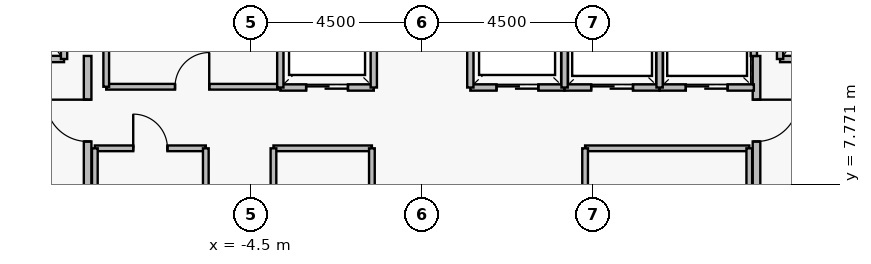
"""IFC4 building model, lengths in metres.
Left out: names, types, materials, properties, quantities, classifications, styles, units other than length and angle.
Written with IfcOpenShell. Run it as: python <this file> out.ifc"""

import sys

from ifc_helpers import new_model, si_unit, direction, frame, frame_2d, origin, place, context, subcontext, project, spatial, rectangle, extrude, element, fill, save


model = new_model("IFC4")
c1 = context("Model", 3, precision=1e-05, world=origin(), true_north=direction((0.0, 1.0)))
c2 = subcontext(c1, "Body", "Model", "MODEL_VIEW")
j1 = project(units=[si_unit("LENGTHUNIT", "METRE"), si_unit("PLANEANGLEUNIT", "RADIAN")], contexts=[c1])
p1 = place(None, origin())
s1 = spatial("IfcSite", under=j1, at=p1, CompositionType="ELEMENT")
p2 = place(p1, origin())
s2 = spatial("IfcBuilding", under=s1, at=p2, CompositionType="ELEMENT")
p3 = place(p2, frame((0.0, 0.0, 226.15)))
s3 = spatial("IfcBuildingStorey", under=s2, at=p3, CompositionType="ELEMENT", Elevation=226.15)
p4 = place(p3, frame((-8.8, 5.05, 0.0), z_axis=(0.0, 0.0, 1.0), x_axis=(0.0, 1.0, 0.0)))
e1 = element("IfcWall", 1, at=p4, inside=s3, PredefinedType="PARTITIONING", context=c2, shape_type="SweptSolid", body=[
    extrude(rectangle(XDim=6.1, YDim=0.2, at=frame_2d((3.05, 0.0))), origin(), (0.0, 0.0, 1.0), 3.53),
])
p5 = place(p4, frame((0.25, 0.0, 0.0)))
e2 = element("IfcOpeningElement", 2, at=p5, cuts=e1, PredefinedType="OPENING", context=c2, shape_type="SweptSolid", body=[
    extrude(rectangle(XDim=1.1, YDim=2.2, at=frame_2d((0.55, 1.1))), frame((0.0, 0.11, 0.0), z_axis=(0.0, -1.0, 0.0), x_axis=(1.0, 0.0, 0.0)), (0.0, 0.0, 1.0), 0.22),
])
p6 = place(p4, frame((3.85, 0.0, 0.0)))
e3 = element("IfcOpeningElement", 3, at=p6, cuts=e1, PredefinedType="OPENING", context=c2, shape_type="SweptSolid", body=[
    extrude(rectangle(XDim=1.1, YDim=2.2, at=frame_2d((0.55, 1.1))), frame((0.0, 0.11, 0.0), z_axis=(0.0, -1.0, 0.0), x_axis=(1.0, 0.0, 0.0)), (0.0, 0.0, 1.0), 0.22),
])
p7 = place(p3, frame((8.8, 11.15, 0.0), z_axis=(0.0, 0.0, 1.0), x_axis=(0.0, -1.0, 0.0)))
e4 = element("IfcWall", 4, at=p7, inside=s3, PredefinedType="PARTITIONING", context=c2, shape_type="SweptSolid", body=[
    extrude(rectangle(XDim=6.1, YDim=0.2, at=frame_2d((3.05, 0.0))), origin(), (0.0, 0.0, 1.0), 3.53),
])
p8 = place(p7, frame((1.15, 0.0, 0.0)))
e5 = element("IfcOpeningElement", 5, at=p8, cuts=e4, PredefinedType="OPENING", context=c2, shape_type="SweptSolid", body=[
    extrude(rectangle(XDim=1.1, YDim=2.2, at=frame_2d((0.55, 1.1))), frame((0.0, 0.11, 0.0), z_axis=(0.0, -1.0, 0.0), x_axis=(1.0, 0.0, 0.0)), (0.0, 0.0, 1.0), 0.22),
])
p9 = place(p7, frame((4.75, 0.0, 0.0)))
e6 = element("IfcOpeningElement", 6, at=p9, cuts=e4, PredefinedType="OPENING", context=c2, shape_type="SweptSolid", body=[
    extrude(rectangle(XDim=1.1, YDim=2.2, at=frame_2d((0.55, 1.1))), frame((0.0, 0.11, 0.0), z_axis=(0.0, -1.0, 0.0), x_axis=(1.0, 0.0, 0.0)), (0.0, 0.0, 1.0), 0.22),
])
p10 = place(p3, frame((-11.58, 11.07, 0.0), z_axis=(0.0, 0.0, 1.0), x_axis=(1.0, 0.0, 0.0)))
e7 = element("IfcWall", 7, at=p10, inside=s3, PredefinedType="PARTITIONING", context=c2, shape_type="SweptSolid", body=[
    extrude(rectangle(XDim=2.16, YDim=0.165, at=frame_2d((1.08, 0.0))), origin(), (0.0, 0.0, 1.0), 3.53),
])
p11 = place(p10, frame((0.53, 0.0, 0.0)))
e8 = element("IfcOpeningElement", 8, at=p11, cuts=e7, PredefinedType="OPENING", context=c2, shape_type="SweptSolid", body=[
    extrude(rectangle(XDim=1.15, YDim=2.25, at=frame_2d((0.575, 1.125))), frame((0.0, 0.093, 0.0), z_axis=(0.0, -1.0, 0.0), x_axis=(1.0, 0.0, 0.0)), (0.0, 0.0, 1.0), 0.185),
])
p12 = place(p3, frame((9.42, 11.07, 0.0), z_axis=(0.0, 0.0, 1.0), x_axis=(1.0, 0.0, 0.0)))
e9 = element("IfcWall", 9, at=p12, inside=s3, PredefinedType="PARTITIONING", context=c2, shape_type="SweptSolid", body=[
    extrude(rectangle(XDim=2.16, YDim=0.165, at=frame_2d((1.08, 0.0))), origin(), (0.0, 0.0, 1.0), 3.53),
])
p13 = place(p12, frame((0.53, 0.0, 0.0)))
e10 = element("IfcOpeningElement", 10, at=p13, cuts=e9, PredefinedType="OPENING", context=c2, shape_type="SweptSolid", body=[
    extrude(rectangle(XDim=1.15, YDim=2.25, at=frame_2d((0.575, 1.125))), frame((0.0, 0.093, 0.0), z_axis=(0.0, -1.0, 0.0), x_axis=(1.0, 0.0, 0.0)), (0.0, 0.0, 1.0), 0.185),
])
p14 = place(p3, frame((-3.73, 10.32, 0.0), z_axis=(0.0, 0.0, 1.0), x_axis=(1.0, 0.0, 0.0)))
e11 = element("IfcWall", 11, at=p14, inside=s3, PredefinedType="PARTITIONING", context=c2, shape_type="SweptSolid", body=[
    extrude(rectangle(XDim=2.46, YDim=0.165, at=frame_2d((1.23, 0.0))), origin(), (0.0, 0.0, 1.0), 3.53),
])
p15 = place(p14, frame((0.68, 0.0, 0.0)))
e12 = element("IfcOpeningElement", 12, at=p15, cuts=e11, PredefinedType="OPENING", context=c2, shape_type="SweptSolid", body=[
    extrude(rectangle(XDim=1.1, YDim=2.25, at=frame_2d((0.55, 1.125))), frame((0.0, 0.093, 0.0), z_axis=(0.0, -1.0, 0.0), x_axis=(1.0, 0.0, 0.0)), (0.0, 0.0, 1.0), 0.185),
])
p16 = place(p3, frame((1.27, 10.32, 0.0), z_axis=(0.0, 0.0, 1.0), x_axis=(1.0, 0.0, 0.0)))
e13 = element("IfcWall", 13, at=p16, inside=s3, PredefinedType="PARTITIONING", context=c2, shape_type="SweptSolid", body=[
    extrude(rectangle(XDim=2.48, YDim=0.165, at=frame_2d((1.24, 0.0))), origin(), (0.0, 0.0, 1.0), 3.53),
])
p17 = place(p16, frame((0.69, 0.0, 0.0)))
e14 = element("IfcOpeningElement", 14, at=p17, cuts=e13, PredefinedType="OPENING", context=c2, shape_type="SweptSolid", body=[
    extrude(rectangle(XDim=1.1, YDim=2.25, at=frame_2d((0.55, 1.125))), frame((0.0, 0.093, 0.0), z_axis=(0.0, -1.0, 0.0), x_axis=(1.0, 0.0, 0.0)), (0.0, 0.0, 1.0), 0.185),
])
p18 = place(p3, frame((3.75, 10.32, 0.0), z_axis=(0.0, 0.0, 1.0), x_axis=(1.0, 0.0, 0.0)))
e15 = element("IfcWall", 15, at=p18, inside=s3, PredefinedType="PARTITIONING", context=c2, shape_type="SweptSolid", body=[
    extrude(rectangle(XDim=2.5, YDim=0.165, at=frame_2d((1.25, 0.0))), origin(), (0.0, 0.0, 1.0), 3.53),
])
p19 = place(p18, frame((0.7, 0.0, 0.0)))
e16 = element("IfcOpeningElement", 16, at=p19, cuts=e15, PredefinedType="OPENING", context=c2, shape_type="SweptSolid", body=[
    extrude(rectangle(XDim=1.1, YDim=2.25, at=frame_2d((0.55, 1.125))), frame((0.0, 0.093, 0.0), z_axis=(0.0, -1.0, 0.0), x_axis=(1.0, 0.0, 0.0)), (0.0, 0.0, 1.0), 0.185),
])
p20 = place(p3, frame((6.25, 10.32, 0.0), z_axis=(0.0, 0.0, 1.0), x_axis=(1.0, 0.0, 0.0)))
e17 = element("IfcWall", 17, at=p20, inside=s3, PredefinedType="PARTITIONING", context=c2, shape_type="SweptSolid", body=[
    extrude(rectangle(XDim=2.48, YDim=0.165, at=frame_2d((1.24, 0.0))), origin(), (0.0, 0.0, 1.0), 3.53),
])
p21 = place(p20, frame((0.69, 0.0, 0.0)))
e18 = element("IfcOpeningElement", 18, at=p21, cuts=e17, PredefinedType="OPENING", context=c2, shape_type="SweptSolid", body=[
    extrude(rectangle(XDim=1.1, YDim=2.25, at=frame_2d((0.55, 1.125))), frame((0.0, 0.093, 0.0), z_axis=(0.0, -1.0, 0.0), x_axis=(1.0, 0.0, 0.0)), (0.0, 0.0, 1.0), 0.185),
])
p22 = place(p3, frame((-8.31, 10.34, 0.0), z_axis=(0.0, 0.0, 1.0), x_axis=(1.0, 0.0, 0.0)))
e19 = element("IfcWall", 19, at=p22, inside=s3, PredefinedType="PARTITIONING", context=c2, shape_type="SweptSolid", body=[
    extrude(rectangle(XDim=4.52, YDim=0.15, at=frame_2d((2.26, 0.0))), origin(), (0.0, 0.0, 1.0), 3.53),
])
p23 = place(p22, frame((1.81, 0.0, 0.0)))
e20 = element("IfcOpeningElement", 20, at=p23, cuts=e19, PredefinedType="OPENING", context=c2, shape_type="SweptSolid", body=[
    extrude(rectangle(XDim=0.9, YDim=2.15, at=frame_2d((0.45, 1.075))), frame((0.0, 0.085, 0.0), z_axis=(0.0, -1.0, 0.0), x_axis=(1.0, 0.0, 0.0)), (0.0, 0.0, 1.0), 0.17),
])
p24 = place(p3, frame((-8.61, 8.72, 0.0), z_axis=(0.0, 0.0, 1.0), x_axis=(1.0, 0.0, 0.0)))
e21 = element("IfcWall", 21, at=p24, inside=s3, PredefinedType="PARTITIONING", context=c2, shape_type="SweptSolid", body=[
    extrude(rectangle(XDim=2.92, YDim=0.15, at=frame_2d((1.46, 0.0))), origin(), (0.0, 0.0, 1.0), 3.53),
])
p25 = place(p24, frame((1.01, 0.0, 0.0)))
e22 = element("IfcOpeningElement", 22, at=p25, cuts=e21, PredefinedType="OPENING", context=c2, shape_type="SweptSolid", body=[
    extrude(rectangle(XDim=0.9, YDim=2.15, at=frame_2d((0.45, 1.075))), frame((0.0, 0.085, 0.0), z_axis=(0.0, -1.0, 0.0), x_axis=(1.0, 0.0, 0.0)), (0.0, 0.0, 1.0), 0.17),
])
for number, where, z_axis, x_axis in (
    (23, (-9.42, 11.07, 0.0), (0.0, 0.0, 1.0), (0.0, 1.0, 0.0)),
    (24, (9.42, 11.07, 0.0), (0.0, 0.0, 1.0), (0.0, 1.0, 0.0)),
):
    element("IfcWall", number, at=place(p3, frame(where, z_axis=z_axis, x_axis=x_axis)), inside=s3, PredefinedType="PARTITIONING", context=c2, shape_type="SweptSolid", body=[
        extrude(rectangle(XDim=2.96, YDim=0.165, at=frame_2d((1.48, 0.0))), origin(), (0.0, 0.0, 1.0), 3.53),
    ])
for number, where, z_axis, x_axis in (
    (25, (-3.73, 10.32, 0.0), (0.0, 0.0, 1.0), (0.0, 1.0, 0.0)),
    (26, (-1.27, 10.32, 0.0), (0.0, 0.0, 1.0), (0.0, 1.0, 0.0)),
    (27, (1.27, 10.32, 0.0), (0.0, 0.0, 1.0), (0.0, 1.0, 0.0)),
    (28, (3.75, 10.32, 0.0), (0.0, 0.0, 1.0), (0.0, 1.0, 0.0)),
    (29, (6.25, 10.32, 0.0), (0.0, 0.0, 1.0), (0.0, 1.0, 0.0)),
):
    element("IfcWall", number, at=place(p3, frame(where, z_axis=z_axis, x_axis=x_axis)), inside=s3, PredefinedType="PARTITIONING", context=c2, shape_type="SweptSolid", body=[
        extrude(rectangle(XDim=2.36, YDim=0.165, at=frame_2d((1.18, 0.0))), origin(), (0.0, 0.0, 1.0), 3.53),
    ])
p26 = place(p3, frame((8.73, 11.15, 0.0), z_axis=(0.0, 0.0, 1.0), x_axis=(0.0, 1.0, 0.0)))
e30 = element("IfcWall", 30, at=p26, inside=s3, PredefinedType="PARTITIONING", context=c2, shape_type="SweptSolid", body=[
    extrude(rectangle(XDim=1.53, YDim=0.165, at=frame_2d((0.765, 0.0))), origin(), (0.0, 0.0, 1.0), 3.53),
])
p27 = place(p3, frame((-8.31, 10.34, 0.0), z_axis=(0.0, 0.0, 1.0), x_axis=(0.0, 1.0, 0.0)))
e31 = element("IfcWall", 31, at=p27, inside=s3, PredefinedType="PARTITIONING", context=c2, shape_type="SweptSolid", body=[
    extrude(rectangle(XDim=2.52, YDim=0.15, at=frame_2d((1.26, 0.0))), origin(), (0.0, 0.0, 1.0), 3.53),
])
for number, where, z_axis, x_axis in (
    (32, (-8.61, 6.48, 0.0), (0.0, 0.0, 1.0), (0.0, 1.0, 0.0)),
    (33, (-5.69, 6.48, 0.0), (0.0, 0.0, 1.0), (0.0, 1.0, 0.0)),
):
    element("IfcWall", number, at=place(p3, frame(where, z_axis=z_axis, x_axis=x_axis)), inside=s3, PredefinedType="PARTITIONING", context=c2, shape_type="SweptSolid", body=[
        extrude(rectangle(XDim=2.24, YDim=0.15, at=frame_2d((1.12, 0.0))), origin(), (0.0, 0.0, 1.0), 3.53),
    ])
p28 = place(p3, frame((-3.91, 8.72, 0.0), z_axis=(0.0, 0.0, 1.0), x_axis=(1.0, 0.0, 0.0)))
e34 = element("IfcWall", 34, at=p28, inside=s3, PredefinedType="PARTITIONING", context=c2, shape_type="SweptSolid", body=[
    extrude(rectangle(XDim=2.59, YDim=0.15, at=frame_2d((1.295, 0.0))), origin(), (0.0, 0.0, 1.0), 3.53),
])
for number, where, z_axis, x_axis in (
    (35, (-3.91, 6.48, 0.0), (0.0, 0.0, 1.0), (0.0, 1.0, 0.0)),
    (36, (-1.32, 6.48, 0.0), (0.0, 0.0, 1.0), (0.0, 1.0, 0.0)),
):
    element("IfcWall", number, at=place(p3, frame(where, z_axis=z_axis, x_axis=x_axis)), inside=s3, PredefinedType="PARTITIONING", context=c2, shape_type="SweptSolid", body=[
        extrude(rectangle(XDim=2.24, YDim=0.15, at=frame_2d((1.12, 0.0))), origin(), (0.0, 0.0, 1.0), 3.53),
    ])
p29 = place(p3, frame((4.29, 8.72, 0.0), z_axis=(0.0, 0.0, 1.0), x_axis=(1.0, 0.0, 0.0)))
e37 = element("IfcWall", 37, at=p29, inside=s3, PredefinedType="PARTITIONING", context=c2, shape_type="SweptSolid", body=[
    extrude(rectangle(XDim=4.32, YDim=0.15, at=frame_2d((2.16, 0.0))), origin(), (0.0, 0.0, 1.0), 3.53),
])
for number, where, z_axis, x_axis in (
    (38, (4.29, 6.48, 0.0), (0.0, 0.0, 1.0), (0.0, 1.0, 0.0)),
    (39, (8.61, 6.48, 0.0), (0.0, 0.0, 1.0), (0.0, 1.0, 0.0)),
):
    element("IfcWall", number, at=place(p3, frame(where, z_axis=z_axis, x_axis=x_axis)), inside=s3, PredefinedType="PARTITIONING", context=c2, shape_type="SweptSolid", body=[
        extrude(rectangle(XDim=2.24, YDim=0.15, at=frame_2d((1.12, 0.0))), origin(), (0.0, 0.0, 1.0), 3.53),
    ])
p30 = place(p6, origin())
e40 = element("IfcDoor", 40, at=p30, inside=s3, OperationType="SINGLE_SWING_RIGHT", PredefinedType="DOOR", context=c2, shape_type="SweptSolid", body=[
    extrude(rectangle(XDim=1.1, YDim=2.2, at=frame_2d((0.55, 1.1))), frame((0.0, 0.025, 0.0), z_axis=(0.0, -1.0, 0.0), x_axis=(1.0, 0.0, 0.0)), (0.0, 0.0, 1.0), 0.05),
])
fill(e3, e40)
p31 = place(p8, origin())
e41 = element("IfcDoor", 41, at=p31, inside=s3, OperationType="SINGLE_SWING_LEFT", PredefinedType="DOOR", context=c2, shape_type="SweptSolid", body=[
    extrude(rectangle(XDim=1.1, YDim=2.2, at=frame_2d((0.55, 1.1))), frame((0.0, 0.025, 0.0), z_axis=(0.0, -1.0, 0.0), x_axis=(1.0, 0.0, 0.0)), (0.0, 0.0, 1.0), 0.05),
])
fill(e5, e41)
p32 = place(p15, origin())
e42 = element("IfcDoor", 42, at=p32, inside=s3, OperationType="SLIDING_TO_LEFT", PredefinedType="DOOR", context=c2, shape_type="SweptSolid", body=[
    extrude(rectangle(XDim=1.1, YDim=2.25, at=frame_2d((0.55, 1.125))), frame((0.0, 0.025, 0.0), z_axis=(0.0, -1.0, 0.0), x_axis=(1.0, 0.0, 0.0)), (0.0, 0.0, 1.0), 0.05),
])
fill(e12, e42)
p33 = place(p17, origin())
e43 = element("IfcDoor", 43, at=p33, inside=s3, OperationType="SLIDING_TO_LEFT", PredefinedType="DOOR", context=c2, shape_type="SweptSolid", body=[
    extrude(rectangle(XDim=1.1, YDim=2.25, at=frame_2d((0.55, 1.125))), frame((0.0, 0.025, 0.0), z_axis=(0.0, -1.0, 0.0), x_axis=(1.0, 0.0, 0.0)), (0.0, 0.0, 1.0), 0.05),
])
fill(e14, e43)
p34 = place(p19, origin())
e44 = element("IfcDoor", 44, at=p34, inside=s3, OperationType="SLIDING_TO_LEFT", PredefinedType="DOOR", context=c2, shape_type="SweptSolid", body=[
    extrude(rectangle(XDim=1.1, YDim=2.25, at=frame_2d((0.55, 1.125))), frame((0.0, 0.025, 0.0), z_axis=(0.0, -1.0, 0.0), x_axis=(1.0, 0.0, 0.0)), (0.0, 0.0, 1.0), 0.05),
])
fill(e16, e44)
p35 = place(p21, origin())
e45 = element("IfcDoor", 45, at=p35, inside=s3, OperationType="SLIDING_TO_LEFT", PredefinedType="DOOR", context=c2, shape_type="SweptSolid", body=[
    extrude(rectangle(XDim=1.1, YDim=2.25, at=frame_2d((0.55, 1.125))), frame((0.0, 0.025, 0.0), z_axis=(0.0, -1.0, 0.0), x_axis=(1.0, 0.0, 0.0)), (0.0, 0.0, 1.0), 0.05),
])
fill(e18, e45)
p36 = place(p23, origin())
e46 = element("IfcDoor", 46, at=p36, inside=s3, OperationType="SINGLE_SWING_RIGHT", PredefinedType="DOOR", context=c2, shape_type="SweptSolid", body=[
    extrude(rectangle(XDim=0.9, YDim=2.15, at=frame_2d((0.45, 1.075))), frame((0.0, 0.025, 0.0), z_axis=(0.0, -1.0, 0.0), x_axis=(1.0, 0.0, 0.0)), (0.0, 0.0, 1.0), 0.05),
])
fill(e20, e46)
p37 = place(p25, origin())
e47 = element("IfcDoor", 47, at=p37, inside=s3, OperationType="SINGLE_SWING_LEFT", PredefinedType="DOOR", context=c2, shape_type="SweptSolid", body=[
    extrude(rectangle(XDim=0.9, YDim=2.15, at=frame_2d((0.45, 1.075))), frame((0.0, 0.025, 0.0), z_axis=(0.0, -1.0, 0.0), x_axis=(1.0, 0.0, 0.0)), (0.0, 0.0, 1.0), 0.05),
])
fill(e22, e47)
save(model, sys.argv[1])
